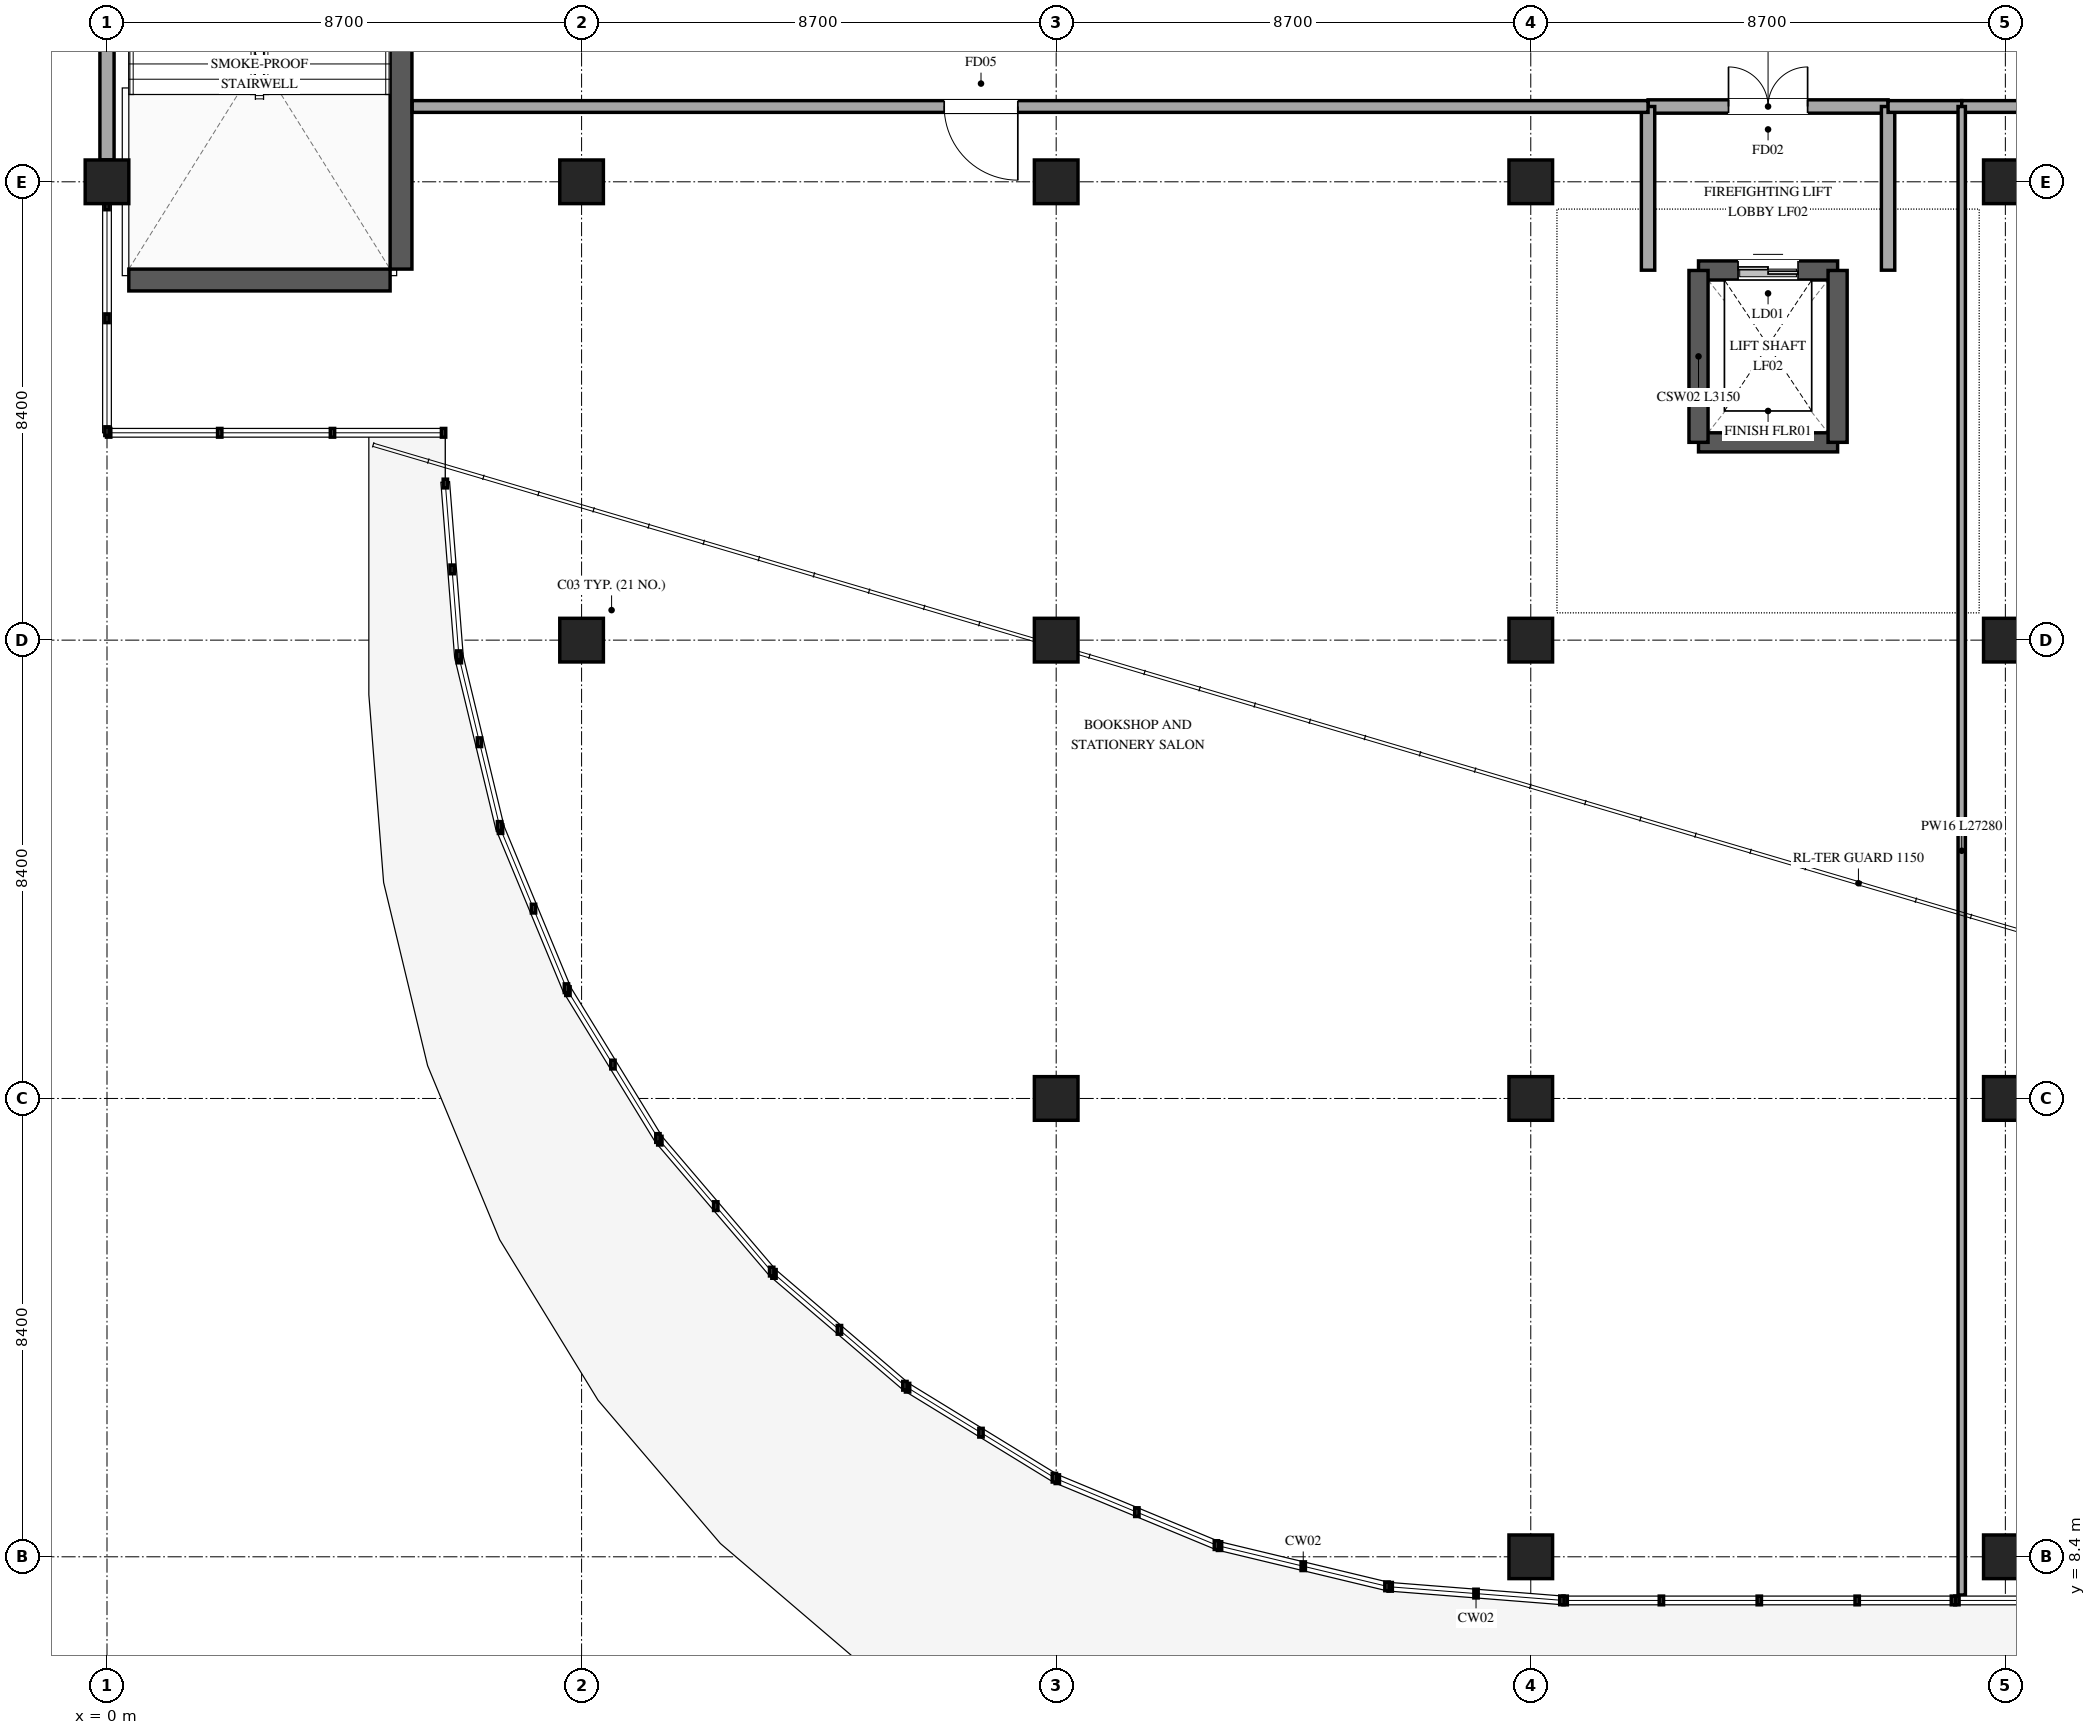
"""IFC4 building model, lengths in metres.
Left out: names, types, materials, properties, quantities, classifications, styles, units other than length and angle.
Written with IfcOpenShell. Run it as: python <this file> out.ifc"""

import sys

from ifc_helpers import new_model, si_unit, direction, frame, frame_2d, origin, origin_2d, place, context, subcontext, project, spatial, rectangle, extrude, element, fill, save


model = new_model("IFC4")
c1 = context("Model", 3, precision=1e-05, world=origin(), true_north=direction((0.0, 1.0)))
c2 = subcontext(c1, "Body", "Model", "MODEL_VIEW")
j1 = project(units=[si_unit("LENGTHUNIT", "METRE"), si_unit("PLANEANGLEUNIT", "RADIAN")], contexts=[c1])
p1 = place(None, origin())
s1 = spatial("IfcSite", under=j1, at=p1, CompositionType="ELEMENT")
p2 = place(p1, origin())
s2 = spatial("IfcBuilding", under=s1, at=p2, CompositionType="ELEMENT")
p3 = place(p2, frame((0.0, 0.0, 21.6)))
s3 = spatial("IfcBuildingStorey", under=s2, at=p3, CompositionType="ELEMENT", Elevation=21.6)
for number, where, z_axis, x_axis in (
    (1, (0.0, 33.6, 0.0), (0.0, 0.0, 1.0), (1.0, 0.0, 0.0)),
    (2, (8.7, 25.2, 0.0), (0.0, 0.0, 1.0), (1.0, 0.0, 0.0)),
    (3, (8.7, 33.6, 0.0), (0.0, 0.0, 1.0), (1.0, 0.0, 0.0)),
    (4, (17.4, 16.8, 0.0), (0.0, 0.0, 1.0), (1.0, 0.0, 0.0)),
    (5, (17.4, 25.2, 0.0), (0.0, 0.0, 1.0), (1.0, 0.0, 0.0)),
    (6, (17.4, 33.6, 0.0), (0.0, 0.0, 1.0), (1.0, 0.0, 0.0)),
    (7, (26.1, 8.4, 0.0), (0.0, 0.0, 1.0), (1.0, 0.0, 0.0)),
    (8, (26.1, 16.8, 0.0), (0.0, 0.0, 1.0), (1.0, 0.0, 0.0)),
    (9, (26.1, 25.2, 0.0), (0.0, 0.0, 1.0), (1.0, 0.0, 0.0)),
    (10, (26.1, 33.6, 0.0), (0.0, 0.0, 1.0), (1.0, 0.0, 0.0)),
    (11, (34.8, 8.4, 0.0), (0.0, 0.0, 1.0), (1.0, 0.0, 0.0)),
    (12, (34.8, 16.8, 0.0), (0.0, 0.0, 1.0), (1.0, 0.0, 0.0)),
    (13, (34.8, 25.2, 0.0), (0.0, 0.0, 1.0), (1.0, 0.0, 0.0)),
    (14, (34.8, 33.6, 0.0), (0.0, 0.0, 1.0), (1.0, 0.0, 0.0)),
):
    element("IfcColumn", number, at=place(p3, frame(where, z_axis=z_axis, x_axis=x_axis)), inside=s3, PredefinedType="COLUMN", context=c2, shape_type="SweptSolid", body=[
        extrude(rectangle(XDim=0.8, YDim=0.8, at=origin_2d()), origin(), (0.0, 0.0, 1.0), 5.1),
    ])
p4 = place(p3, frame((0.0, 34.002, 0.0), z_axis=(0.0, 0.0, 1.0), x_axis=(0.0, 1.0, 0.0)))
e15 = element("IfcWall", 15, at=p4, inside=s3, PredefinedType="STANDARD", context=c2, shape_type="SweptSolid", body=[
    extrude(rectangle(XDim=7.596, YDim=0.26, at=frame_2d((3.798, 0.0))), origin(), (0.0, 0.0, 1.0), 4.79),
])
p5 = place(p3, frame((5.39, 42.0, 0.0), z_axis=(0.0, 0.0, 1.0), x_axis=(0.0, -1.0, 0.0)))
e16 = element("IfcWall", 16, at=p5, inside=s3, PredefinedType="SHEAR", context=c2, shape_type="SweptSolid", body=[
    extrude(rectangle(XDim=10.0, YDim=0.4, at=frame_2d((5.0, 0.0))), origin(), (0.0, 0.0, 1.0), 5.1),
])
p6 = place(p5, frame((0.41, 0.0, 0.0)))
e17 = element("IfcOpeningElement", 17, at=p6, cuts=e16, PredefinedType="OPENING", context=c2, shape_type="SweptSolid", body=[
    extrude(rectangle(XDim=1.5, YDim=2.2, at=frame_2d((0.75, 1.1))), frame((0.0, 0.21, 0.0), z_axis=(0.0, -1.0, 0.0), x_axis=(1.0, 0.0, 0.0)), (0.0, 0.0, 1.0), 0.42),
])
p7 = place(p3, frame((5.19, 31.8, 0.0), z_axis=(0.0, 0.0, 1.0), x_axis=(-1.0, 0.0, 0.0)))
e18 = element("IfcWall", 18, at=p7, inside=s3, PredefinedType="SHEAR", context=c2, shape_type="SweptSolid", body=[
    extrude(rectangle(XDim=4.79, YDim=0.4, at=frame_2d((2.395, 0.0))), origin(), (0.0, 0.0, 1.0), 5.1),
])
p8 = place(p3, frame((29.175, 31.975, 0.0), z_axis=(0.0, 0.0, 1.0), x_axis=(1.0, 0.0, 0.0)))
e19 = element("IfcWall", 19, at=p8, inside=s3, PredefinedType="SHEAR", context=c2, shape_type="SweptSolid", body=[
    extrude(rectangle(XDim=2.55, YDim=0.35, at=frame_2d((1.275, 0.0))), origin(), (0.0, 0.0, 1.0), 5.1),
])
p9 = place(p8, frame((0.725, 0.0, 0.0)))
e20 = element("IfcOpeningElement", 20, at=p9, cuts=e19, PredefinedType="OPENING", context=c2, shape_type="SweptSolid", body=[
    extrude(rectangle(XDim=1.1, YDim=2.2, at=frame_2d((0.55, 1.1))), frame((0.0, 0.185, 0.0), z_axis=(0.0, -1.0, 0.0), x_axis=(1.0, 0.0, 0.0)), (0.0, 0.0, 1.0), 0.37),
])
p10 = place(p3, frame((31.725, 28.825, 0.0), z_axis=(0.0, 0.0, 1.0), x_axis=(-1.0, 0.0, 0.0)))
e21 = element("IfcWall", 21, at=p10, inside=s3, PredefinedType="SHEAR", context=c2, shape_type="SweptSolid", body=[
    extrude(rectangle(XDim=2.55, YDim=0.35, at=frame_2d((1.275, 0.0))), origin(), (0.0, 0.0, 1.0), 5.1),
])
for number, where, z_axis, x_axis in (
    (22, (29.175, 28.825, 0.0), (0.0, 0.0, 1.0), (0.0, 1.0, 0.0)),
    (23, (31.725, 31.975, 0.0), (0.0, 0.0, 1.0), (0.0, -1.0, 0.0)),
):
    element("IfcWall", number, at=place(p3, frame(where, z_axis=z_axis, x_axis=x_axis)), inside=s3, PredefinedType="SHEAR", context=c2, shape_type="SweptSolid", body=[
        extrude(rectangle(XDim=3.15, YDim=0.35, at=frame_2d((1.575, 0.0))), origin(), (0.0, 0.0, 1.0), 5.1),
    ])
p11 = place(p3, frame((28.25, 34.98, 0.0), z_axis=(0.0, 0.0, 1.0), x_axis=(1.0, 0.0, 0.0)))
e24 = element("IfcWall", 24, at=p11, inside=s3, PredefinedType="STANDARD", context=c2, shape_type="SweptSolid", body=[
    extrude(rectangle(XDim=4.4, YDim=0.245, at=frame_2d((2.2, 0.0))), origin(), (0.0, 0.0, 1.0), 4.76),
])
p12 = place(p11, frame((1.475, 0.0, 0.0)))
e25 = element("IfcOpeningElement", 25, at=p12, cuts=e24, PredefinedType="OPENING", context=c2, shape_type="SweptSolid", body=[
    extrude(rectangle(XDim=1.45, YDim=2.2, at=frame_2d((0.725, 1.1))), frame((0.0, 0.133, 0.0), z_axis=(0.0, -1.0, 0.0), x_axis=(1.0, 0.0, 0.0)), (0.0, 0.0, 1.0), 0.265),
])
for number, where, z_axis, x_axis in (
    (26, (28.25, 31.98, 0.0), (0.0, 0.0, 1.0), (0.0, 1.0, 0.0)),
    (27, (32.65, 34.98, 0.0), (0.0, 0.0, 1.0), (0.0, -1.0, 0.0)),
):
    element("IfcWall", number, at=place(p3, frame(where, z_axis=z_axis, x_axis=x_axis)), inside=s3, PredefinedType="STANDARD", context=c2, shape_type="SweptSolid", body=[
        extrude(rectangle(XDim=3.0, YDim=0.245, at=frame_2d((1.5, 0.0))), origin(), (0.0, 0.0, 1.0), 4.06),
    ])
p13 = place(p3, frame((28.25, 34.98, 0.0), z_axis=(0.0, 0.0, 1.0), x_axis=(-1.0, 0.0, 0.0)))
e28 = element("IfcWall", 28, at=p13, inside=s3, PredefinedType="PARTITIONING", context=c2, shape_type="SweptSolid", body=[
    extrude(rectangle(XDim=22.655, YDim=0.215, at=frame_2d((11.328, 0.0))), origin(), (0.0, 0.0, 1.0), 4.06),
])
p14 = place(p13, frame((11.553, 0.0, 0.0)))
e29 = element("IfcOpeningElement", 29, at=p14, cuts=e28, PredefinedType="OPENING", context=c2, shape_type="SweptSolid", body=[
    extrude(rectangle(XDim=1.35, YDim=2.2, at=frame_2d((0.675, 1.1))), frame((0.0, 0.118, 0.0), z_axis=(0.0, -1.0, 0.0), x_axis=(1.0, 0.0, 0.0)), (0.0, 0.0, 1.0), 0.235),
])
p15 = place(p3, frame((34.0, 34.98, 0.0), z_axis=(0.0, 0.0, 1.0), x_axis=(-1.0, 0.0, 0.0)))
e30 = element("IfcWall", 30, at=p15, inside=s3, PredefinedType="PARTITIONING", context=c2, shape_type="SweptSolid", body=[
    extrude(rectangle(XDim=1.35, YDim=0.215, at=frame_2d((0.675, 0.0))), origin(), (0.0, 0.0, 1.0), 4.76),
])
p16 = place(p3, frame((44.6, 34.98, 0.0), z_axis=(0.0, 0.0, 1.0), x_axis=(-1.0, 0.0, 0.0)))
e31 = element("IfcWall", 31, at=p16, inside=s3, PredefinedType="PARTITIONING", context=c2, shape_type="SweptSolid", body=[
    extrude(rectangle(XDim=10.6, YDim=0.215, at=frame_2d((5.3, 0.0))), origin(), (0.0, 0.0, 1.0), 4.06),
])
p17 = place(p16, frame((4.625, 0.0, 0.0)))
e32 = element("IfcOpeningElement", 32, at=p17, cuts=e31, PredefinedType="OPENING", context=c2, shape_type="SweptSolid", body=[
    extrude(rectangle(XDim=1.35, YDim=2.2, at=frame_2d((0.675, 1.1))), frame((0.0, 0.118, 0.0), z_axis=(0.0, -1.0, 0.0), x_axis=(1.0, 0.0, 0.0)), (0.0, 0.0, 1.0), 0.235),
])
p18 = place(p3, frame((34.0, 34.98, 0.0), z_axis=(0.0, 0.0, 1.0), x_axis=(0.0, -1.0, 0.0)))
e33 = element("IfcWall", 33, at=p18, inside=s3, PredefinedType="PARTITIONING", context=c2, shape_type="SweptSolid", body=[
    extrude(rectangle(XDim=27.28, YDim=0.135, at=frame_2d((13.64, 0.0))), origin(), (0.0, 0.0, 1.0), 4.06),
])
p19 = place(p9, origin())
e34 = element("IfcDoor", 34, at=p19, inside=s3, OperationType="DOUBLE_DOOR_SLIDING", PredefinedType="DOOR", context=c2, shape_type="SweptSolid", body=[
    extrude(rectangle(XDim=1.1, YDim=2.2, at=frame_2d((0.55, 1.1))), frame((0.0, 0.025, 0.0), z_axis=(0.0, -1.0, 0.0), x_axis=(1.0, 0.0, 0.0)), (0.0, 0.0, 1.0), 0.05),
])
fill(e20, e34)
p20 = place(p12, origin())
e35 = element("IfcDoor", 35, at=p20, inside=s3, OperationType="DOUBLE_DOOR_SINGLE_SWING", PredefinedType="DOOR", context=c2, shape_type="SweptSolid", body=[
    extrude(rectangle(XDim=1.45, YDim=2.2, at=frame_2d((0.725, 1.1))), frame((0.0, 0.025, 0.0), z_axis=(0.0, -1.0, 0.0), x_axis=(1.0, 0.0, 0.0)), (0.0, 0.0, 1.0), 0.05),
])
fill(e25, e35)
p21 = place(p14, origin())
e36 = element("IfcDoor", 36, at=p21, inside=s3, OperationType="SINGLE_SWING_LEFT", PredefinedType="DOOR", context=c2, shape_type="SweptSolid", body=[
    extrude(rectangle(XDim=1.35, YDim=2.2, at=frame_2d((0.675, 1.1))), frame((0.0, 0.025, 0.0), z_axis=(0.0, -1.0, 0.0), x_axis=(1.0, 0.0, 0.0)), (0.0, 0.0, 1.0), 0.05),
])
fill(e29, e36)
save(model, sys.argv[1])
